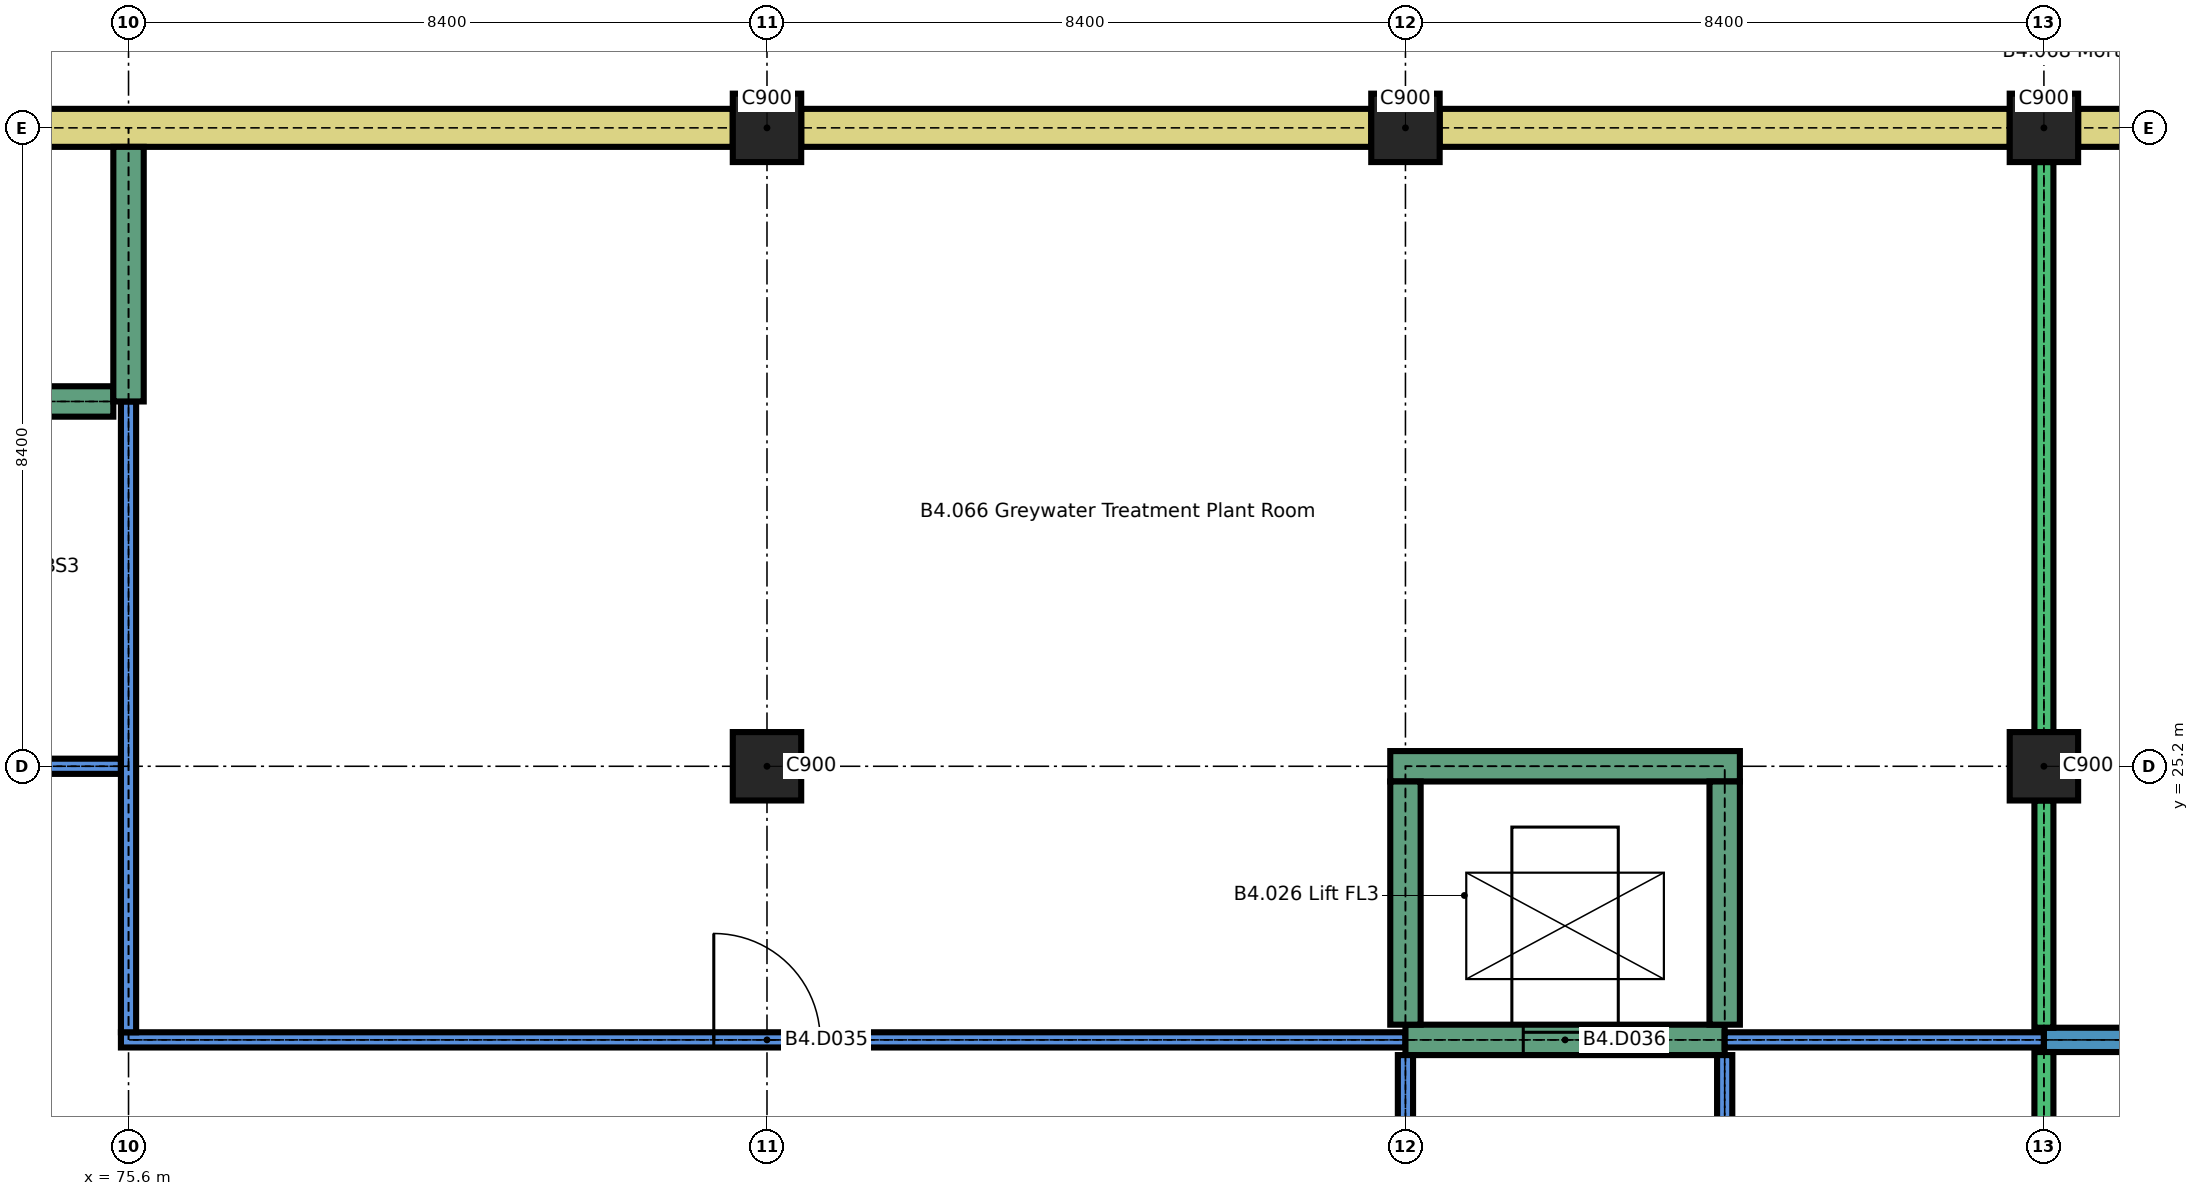
"""IFC4 building model, lengths in metres.
Left out: names, types, materials, properties, quantities, classifications, styles, units other than length and angle.
Written with IfcOpenShell. Run it as: python <this file> out.ifc"""

import sys

from ifc_helpers import new_model, si_unit, direction, frame, frame_2d, origin, origin_2d, place, context, subcontext, project, spatial, rectangle, extrude, element, fill, save


model = new_model("IFC4")
c1 = context("Model", 3, precision=1e-05, world=origin(), true_north=direction((0.0, 1.0)))
c2 = subcontext(c1, "Body", "Model", "MODEL_VIEW")
j1 = project(units=[si_unit("LENGTHUNIT", "METRE"), si_unit("PLANEANGLEUNIT", "RADIAN")], contexts=[c1])
p1 = place(None, origin())
s1 = spatial("IfcSite", under=j1, at=p1, CompositionType="ELEMENT")
p2 = place(p1, origin())
s2 = spatial("IfcBuilding", under=s1, at=p2, CompositionType="ELEMENT")
p3 = place(p2, frame((0.0, 0.0, -15.0)))
s3 = spatial("IfcBuildingStorey", under=s2, at=p3, CompositionType="ELEMENT", Elevation=-15.0)
for number, where, z_axis, x_axis in (
    (1, (84.0, 25.2, 0.0), (0.0, 0.0, 1.0), (1.0, 0.0, 0.0)),
    (2, (100.8, 25.2, 0.0), (0.0, 0.0, 1.0), (1.0, 0.0, 0.0)),
    (3, (84.0, 33.6, 0.0), (0.0, 0.0, 1.0), (1.0, 0.0, 0.0)),
    (4, (92.4, 33.6, 0.0), (0.0, 0.0, 1.0), (1.0, 0.0, 0.0)),
    (5, (100.8, 33.6, 0.0), (0.0, 0.0, 1.0), (1.0, 0.0, 0.0)),
):
    element("IfcColumn", number, at=place(p3, frame(where, z_axis=z_axis, x_axis=x_axis)), inside=s3, PredefinedType="COLUMN", context=c2, shape_type="SweptSolid", body=[
        extrude(rectangle(XDim=0.9, YDim=0.9, at=origin_2d()), origin(), (0.0, 0.0, 1.0), 3.2),
    ])
p4 = place(p3, frame((42.45, 33.6, 0.0), z_axis=(0.0, 0.0, 1.0), x_axis=(1.0, 0.0, 0.0)))
e6 = element("IfcWall", 6, at=p4, inside=s3, PredefinedType="SOLIDWALL", context=c2, shape_type="SweptSolid", body=[
    extrude(rectangle(XDim=41.1, YDim=0.5, at=frame_2d((20.55, 0.0))), origin(), (0.0, 0.0, 1.0), 3.2),
])
for number, where, z_axis, x_axis in (
    (7, (84.45, 33.6, 0.0), (0.0, 0.0, 1.0), (1.0, 0.0, 0.0)),
    (8, (92.85, 33.6, 0.0), (0.0, 0.0, 1.0), (1.0, 0.0, 0.0)),
):
    element("IfcWall", number, at=place(p3, frame(where, z_axis=z_axis, x_axis=x_axis)), inside=s3, PredefinedType="SOLIDWALL", context=c2, shape_type="SweptSolid", body=[
        extrude(rectangle(XDim=7.5, YDim=0.5, at=frame_2d((3.75, 0.0))), origin(), (0.0, 0.0, 1.0), 3.2),
    ])
p5 = place(p3, frame((101.25, 33.6, 0.0), z_axis=(0.0, 0.0, 1.0), x_axis=(1.0, 0.0, 0.0)))
e9 = element("IfcWall", 9, at=p5, inside=s3, PredefinedType="SOLIDWALL", context=c2, shape_type="SweptSolid", body=[
    extrude(rectangle(XDim=32.7, YDim=0.5, at=frame_2d((16.35, 0.0))), origin(), (0.0, 0.0, 1.0), 3.2),
])
p6 = place(p3, frame((75.5, 21.6, 0.0), z_axis=(0.0, 0.0, 1.0), x_axis=(1.0, 0.0, 0.0)))
e10 = element("IfcWall", 10, at=p6, inside=s3, PredefinedType="PARTITIONING", context=c2, shape_type="SweptSolid", body=[
    extrude(rectangle(XDim=16.9, YDim=0.2, at=frame_2d((8.45, 0.0))), origin(), (0.0, 0.0, 1.0), 3.2),
])
p7 = place(p6, frame((7.8, 0.0, 0.0)))
e11 = element("IfcOpeningElement", 11, at=p7, cuts=e10, PredefinedType="OPENING", context=c2, shape_type="SweptSolid", body=[
    extrude(rectangle(XDim=1.4, YDim=2.1, at=frame_2d((0.7, 1.05))), frame((0.0, 0.11, 0.0), z_axis=(0.0, -1.0, 0.0), x_axis=(1.0, 0.0, 0.0)), (0.0, 0.0, 1.0), 0.22),
])
p8 = place(p3, frame((92.4, 21.6, 0.0), z_axis=(0.0, 0.0, 1.0), x_axis=(1.0, 0.0, 0.0)))
e12 = element("IfcWall", 12, at=p8, inside=s3, PredefinedType="SHEAR", context=c2, shape_type="SweptSolid", body=[
    extrude(rectangle(XDim=4.2, YDim=0.4, at=frame_2d((2.1, 0.0))), origin(), (0.0, 0.0, 1.0), 3.2),
])
p9 = place(p8, frame((1.55, 0.0, 0.0)))
e13 = element("IfcOpeningElement", 13, at=p9, cuts=e12, PredefinedType="OPENING", context=c2, shape_type="SweptSolid", body=[
    extrude(rectangle(XDim=1.1, YDim=2.1, at=frame_2d((0.55, 1.05))), frame((0.0, 0.21, 0.0), z_axis=(0.0, -1.0, 0.0), x_axis=(1.0, 0.0, 0.0)), (0.0, 0.0, 1.0), 0.42),
])
p10 = place(p3, frame((96.6, 21.6, 0.0), z_axis=(0.0, 0.0, 1.0), x_axis=(1.0, 0.0, 0.0)))
e14 = element("IfcWall", 14, at=p10, inside=s3, PredefinedType="PARTITIONING", context=c2, shape_type="SweptSolid", body=[
    extrude(rectangle(XDim=4.2, YDim=0.2, at=frame_2d((2.1, 0.0))), origin(), (0.0, 0.0, 1.0), 3.2),
])
p11 = place(p3, frame((100.8, 21.6, 0.0), z_axis=(0.0, 0.0, 1.0), x_axis=(1.0, 0.0, 0.0)))
e15 = element("IfcWall", 15, at=p11, inside=s3, PredefinedType="SOLIDWALL", context=c2, shape_type="SweptSolid", body=[
    extrude(rectangle(XDim=4.36, YDim=0.32, at=frame_2d((2.18, 0.0))), origin(), (0.0, 0.0, 1.0), 3.2),
])
p12 = place(p11, frame((1.4, 0.0, 0.0)))
e16 = element("IfcOpeningElement", 16, at=p12, cuts=e15, PredefinedType="OPENING", context=c2, shape_type="SweptSolid", body=[
    extrude(rectangle(XDim=1.4, YDim=2.1, at=frame_2d((0.7, 1.05))), frame((0.0, 0.17, 0.0), z_axis=(0.0, -1.0, 0.0), x_axis=(1.0, 0.0, 0.0)), (0.0, 0.0, 1.0), 0.34),
])
p13 = place(p3, frame((67.325, 25.2, 0.0), z_axis=(0.0, 0.0, 1.0), x_axis=(1.0, 0.0, 0.0)))
e17 = element("IfcWall", 17, at=p13, inside=s3, PredefinedType="PARTITIONING", context=c2, shape_type="SweptSolid", body=[
    extrude(rectangle(XDim=8.175, YDim=0.2, at=frame_2d((4.087, 0.0))), origin(), (0.0, 0.0, 1.0), 3.2),
])
p14 = place(p13, frame((3.387, 0.0, 0.0)))
e18 = element("IfcOpeningElement", 18, at=p14, cuts=e17, PredefinedType="OPENING", context=c2, shape_type="SweptSolid", body=[
    extrude(rectangle(XDim=1.4, YDim=2.1, at=frame_2d((0.7, 1.05))), frame((0.0, 0.11, 0.0), z_axis=(0.0, -1.0, 0.0), x_axis=(1.0, 0.0, 0.0)), (0.0, 0.0, 1.0), 0.22),
])
p15 = place(p3, frame((92.2, 25.2, 0.0), z_axis=(0.0, 0.0, 1.0), x_axis=(1.0, 0.0, 0.0)))
e19 = element("IfcWall", 19, at=p15, inside=s3, PredefinedType="SHEAR", context=c2, shape_type="SweptSolid", body=[
    extrude(rectangle(XDim=4.6, YDim=0.4, at=frame_2d((2.3, 0.0))), origin(), (0.0, 0.0, 1.0), 3.2),
])
p16 = place(p3, frame((67.4, 30.0, 0.0), z_axis=(0.0, 0.0, 1.0), x_axis=(1.0, 0.0, 0.0)))
e20 = element("IfcWall", 20, at=p16, inside=s3, PredefinedType="SHEAR", context=c2, shape_type="SweptSolid", body=[
    extrude(rectangle(XDim=8.0, YDim=0.4, at=frame_2d((4.0, 0.0))), origin(), (0.0, 0.0, 1.0), 3.2),
])
p17 = place(p16, frame((0.4, 0.0, 0.0)))
e21 = element("IfcOpeningElement", 21, at=p17, cuts=e20, PredefinedType="OPENING", context=c2, shape_type="SweptSolid", body=[
    extrude(rectangle(XDim=1.2, YDim=2.1, at=frame_2d((0.6, 1.05))), frame((0.0, 0.21, 0.0), z_axis=(0.0, -1.0, 0.0), x_axis=(1.0, 0.0, 0.0)), (0.0, 0.0, 1.0), 0.42),
])
p18 = place(p3, frame((75.6, 21.7, 0.0), z_axis=(0.0, 0.0, 1.0), x_axis=(0.0, 1.0, 0.0)))
e22 = element("IfcWall", 22, at=p18, inside=s3, PredefinedType="PARTITIONING", context=c2, shape_type="SweptSolid", body=[
    extrude(rectangle(XDim=8.3, YDim=0.2, at=frame_2d((4.15, 0.0))), origin(), (0.0, 0.0, 1.0), 3.2),
])
p19 = place(p3, frame((75.6, 30.0, 0.0), z_axis=(0.0, 0.0, 1.0), x_axis=(0.0, 1.0, 0.0)))
e23 = element("IfcWall", 23, at=p19, inside=s3, PredefinedType="SHEAR", context=c2, shape_type="SweptSolid", body=[
    extrude(rectangle(XDim=3.35, YDim=0.4, at=frame_2d((1.675, 0.0))), origin(), (0.0, 0.0, 1.0), 3.2),
])
p20 = place(p3, frame((92.4, 16.9, 0.0), z_axis=(0.0, 0.0, 1.0), x_axis=(0.0, 1.0, 0.0)))
e24 = element("IfcWall", 24, at=p20, inside=s3, PredefinedType="PARTITIONING", context=c2, shape_type="SweptSolid", body=[
    extrude(rectangle(XDim=4.5, YDim=0.2, at=frame_2d((2.25, 0.0))), origin(), (0.0, 0.0, 1.0), 3.2),
])
p21 = place(p20, frame((1.25, 0.0, 0.0)))
e25 = element("IfcOpeningElement", 25, at=p21, cuts=e24, PredefinedType="OPENING", context=c2, shape_type="SweptSolid", body=[
    extrude(rectangle(XDim=2.0, YDim=2.4, at=frame_2d((1.0, 1.2))), frame((0.0, 0.11, 0.0), z_axis=(0.0, -1.0, 0.0), x_axis=(1.0, 0.0, 0.0)), (0.0, 0.0, 1.0), 0.22),
])
p22 = place(p3, frame((92.4, 21.8, 0.0), z_axis=(0.0, 0.0, 1.0), x_axis=(0.0, 1.0, 0.0)))
e26 = element("IfcWall", 26, at=p22, inside=s3, PredefinedType="SHEAR", context=c2, shape_type="SweptSolid", body=[
    extrude(rectangle(XDim=3.2, YDim=0.4, at=frame_2d((1.6, 0.0))), origin(), (0.0, 0.0, 1.0), 3.2),
])
p23 = place(p3, frame((96.6, 16.9, 0.0), z_axis=(0.0, 0.0, 1.0), x_axis=(0.0, 1.0, 0.0)))
e27 = element("IfcWall", 27, at=p23, inside=s3, PredefinedType="PARTITIONING", context=c2, shape_type="SweptSolid", body=[
    extrude(rectangle(XDim=4.5, YDim=0.2, at=frame_2d((2.25, 0.0))), origin(), (0.0, 0.0, 1.0), 3.2),
])
p24 = place(p23, frame((1.25, 0.0, 0.0)))
e28 = element("IfcOpeningElement", 28, at=p24, cuts=e27, PredefinedType="OPENING", context=c2, shape_type="SweptSolid", body=[
    extrude(rectangle(XDim=2.0, YDim=2.4, at=frame_2d((1.0, 1.2))), frame((0.0, 0.11, 0.0), z_axis=(0.0, -1.0, 0.0), x_axis=(1.0, 0.0, 0.0)), (0.0, 0.0, 1.0), 0.22),
])
p25 = place(p3, frame((96.6, 21.8, 0.0), z_axis=(0.0, 0.0, 1.0), x_axis=(0.0, 1.0, 0.0)))
e29 = element("IfcWall", 29, at=p25, inside=s3, PredefinedType="SHEAR", context=c2, shape_type="SweptSolid", body=[
    extrude(rectangle(XDim=3.2, YDim=0.4, at=frame_2d((1.6, 0.0))), origin(), (0.0, 0.0, 1.0), 3.2),
])
p26 = place(p3, frame((100.8, 17.25, 0.0), z_axis=(0.0, 0.0, 1.0), x_axis=(0.0, 1.0, 0.0)))
e30 = element("IfcWall", 30, at=p26, inside=s3, PredefinedType="SOLIDWALL", context=c2, shape_type="SweptSolid", body=[
    extrude(rectangle(XDim=4.19, YDim=0.25, at=frame_2d((2.095, 0.0))), origin(), (0.0, 0.0, 1.0), 3.2),
])
p27 = place(p26, frame((1.395, 0.0, 0.0)))
e31 = element("IfcOpeningElement", 31, at=p27, cuts=e30, PredefinedType="OPENING", context=c2, shape_type="SweptSolid", body=[
    extrude(rectangle(XDim=1.4, YDim=2.1, at=frame_2d((0.7, 1.05))), frame((0.0, 0.135, 0.0), z_axis=(0.0, -1.0, 0.0), x_axis=(1.0, 0.0, 0.0)), (0.0, 0.0, 1.0), 0.27),
])
p28 = place(p3, frame((100.8, 21.76, 0.0), z_axis=(0.0, 0.0, 1.0), x_axis=(0.0, 1.0, 0.0)))
e32 = element("IfcWall", 32, at=p28, inside=s3, PredefinedType="SOLIDWALL", context=c2, shape_type="SweptSolid", body=[
    extrude(rectangle(XDim=2.99, YDim=0.25, at=frame_2d((1.495, 0.0))), origin(), (0.0, 0.0, 1.0), 3.2),
])
p29 = place(p3, frame((100.8, 25.65, 0.0), z_axis=(0.0, 0.0, 1.0), x_axis=(0.0, 1.0, 0.0)))
e33 = element("IfcWall", 33, at=p29, inside=s3, PredefinedType="SOLIDWALL", context=c2, shape_type="SweptSolid", body=[
    extrude(rectangle(XDim=7.5, YDim=0.25, at=frame_2d((3.75, 0.0))), origin(), (0.0, 0.0, 1.0), 3.2),
])
p30 = place(p7, origin())
e34 = element("IfcDoor", 34, at=p30, inside=s3, OperationType="SINGLE_SWING_RIGHT", PredefinedType="DOOR", context=c2, shape_type="SweptSolid", body=[
    extrude(rectangle(XDim=1.4, YDim=2.1, at=frame_2d((0.7, 1.05))), frame((0.0, 0.025, 0.0), z_axis=(0.0, -1.0, 0.0), x_axis=(1.0, 0.0, 0.0)), (0.0, 0.0, 1.0), 0.05),
])
fill(e11, e34)
p31 = place(p9, origin())
e35 = element("IfcDoor", 35, at=p31, inside=s3, OperationType="SLIDING_TO_LEFT", PredefinedType="DOOR", context=c2, shape_type="SweptSolid", body=[
    extrude(rectangle(XDim=1.1, YDim=2.1, at=frame_2d((0.55, 1.05))), frame((0.0, 0.025, 0.0), z_axis=(0.0, -1.0, 0.0), x_axis=(1.0, 0.0, 0.0)), (0.0, 0.0, 1.0), 0.05),
])
fill(e13, e35)
save(model, sys.argv[1])
